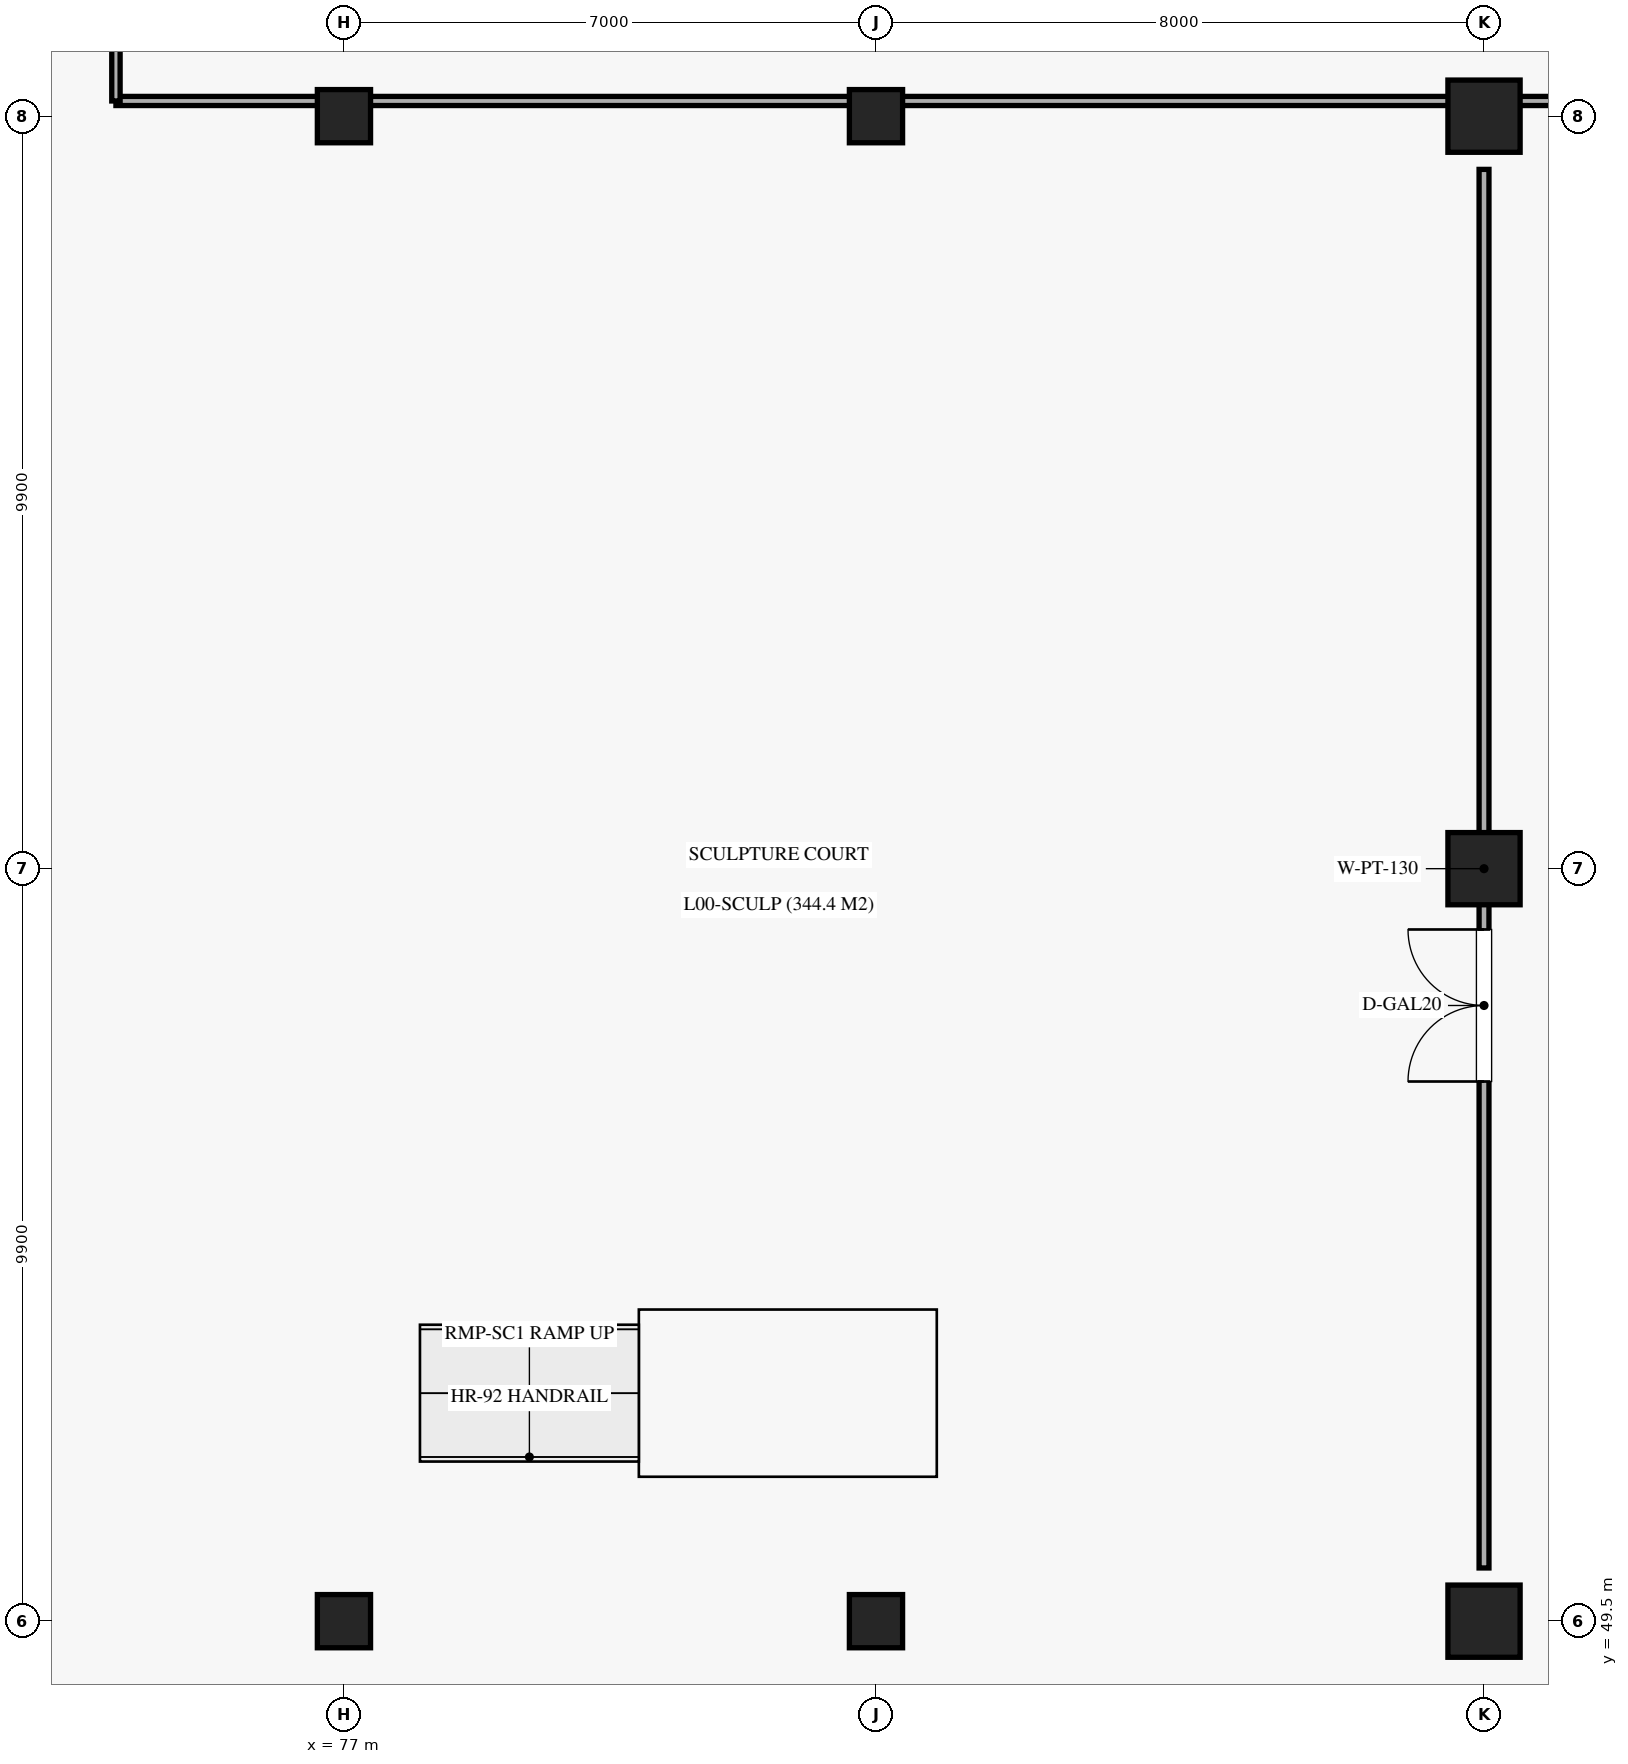
"""IFC4 building model, lengths in metres.
Left out: names, types, materials, properties, quantities, classifications, styles, units other than length and angle.
Written with IfcOpenShell. Run it as: python <this file> out.ifc"""

import sys

from ifc_helpers import new_model, si_unit, direction, frame, frame_2d, origin, origin_2d, place, context, subcontext, project, spatial, rectangle, extrude, element, fill, save


model = new_model("IFC4")
c1 = context("Model", 3, precision=1e-05, world=origin(), true_north=direction((0.0, 1.0)))
c2 = subcontext(c1, "Body", "Model", "MODEL_VIEW")
j1 = project(units=[si_unit("LENGTHUNIT", "METRE"), si_unit("PLANEANGLEUNIT", "RADIAN")], contexts=[c1])
p1 = place(None, origin())
s1 = spatial("IfcSite", under=j1, at=p1, CompositionType="ELEMENT")
p2 = place(p1, origin())
s2 = spatial("IfcBuilding", under=s1, at=p2, CompositionType="ELEMENT")
p3 = place(p2, origin())
s3 = spatial("IfcBuildingStorey", under=s2, at=p3, CompositionType="ELEMENT", Elevation=0.0)
for number, where, z_axis, x_axis in (
    (1, (77.0, 49.5, 0.0), (0.0, 0.0, 1.0), (1.0, 0.0, 0.0)),
    (2, (77.0, 69.3, 0.0), (0.0, 0.0, 1.0), (1.0, 0.0, 0.0)),
    (3, (84.0, 49.5, 0.0), (0.0, 0.0, 1.0), (1.0, 0.0, 0.0)),
    (4, (84.0, 69.3, 0.0), (0.0, 0.0, 1.0), (1.0, 0.0, 0.0)),
):
    element("IfcColumn", number, at=place(p3, frame(where, z_axis=z_axis, x_axis=x_axis)), inside=s3, PredefinedType="COLUMN", context=c2, shape_type="SweptSolid", body=[
        extrude(rectangle(XDim=0.7, YDim=0.7, at=origin_2d()), origin(), (0.0, 0.0, 1.0), 5.44),
    ])
for number, where, z_axis, x_axis in (
    (5, (92.0, 49.5, 0.0), (0.0, 0.0, 1.0), (1.0, 0.0, 0.0)),
    (6, (92.0, 59.4, 0.0), (0.0, 0.0, 1.0), (1.0, 0.0, 0.0)),
    (7, (92.0, 69.3, 0.0), (0.0, 0.0, 1.0), (1.0, 0.0, 0.0)),
):
    element("IfcColumn", number, at=place(p3, frame(where, z_axis=z_axis, x_axis=x_axis)), inside=s3, PredefinedType="COLUMN", context=c2, shape_type="SweptSolid", body=[
        extrude(rectangle(XDim=0.95, YDim=0.95, at=origin_2d()), origin(), (0.0, 0.0, 1.0), 5.44),
    ])
p4 = place(p3, frame((92.0, 50.2, 0.0), z_axis=(0.0, 0.0, 1.0), x_axis=(0.0, 1.0, 0.0)))
e8 = element("IfcWall", 8, at=p4, inside=s3, PredefinedType="PARTITIONING", context=c2, shape_type="SweptSolid", body=[
    extrude(rectangle(XDim=18.4, YDim=0.13, at=frame_2d((9.2, 0.0))), origin(), (0.0, 0.0, 1.0), 4.3),
])
p5 = place(p4, frame((6.4, 0.0, 0.0)))
e9 = element("IfcOpeningElement", 9, at=p5, cuts=e8, PredefinedType="OPENING", context=c2, shape_type="SweptSolid", body=[
    extrude(rectangle(XDim=2.0, YDim=2.5, at=frame_2d((1.0, 1.25))), frame((0.0, 0.075, 0.0), z_axis=(0.0, -1.0, 0.0), x_axis=(1.0, 0.0, 0.0)), (0.0, 0.0, 1.0), 0.15),
])
p6 = place(p3, frame((74.0, 69.5, 0.0), z_axis=(0.0, 0.0, 1.0), x_axis=(1.0, 0.0, 0.0)))
e10 = element("IfcWall", 10, at=p6, inside=s3, PredefinedType="PARTITIONING", context=c2, shape_type="SweptSolid", body=[
    extrude(rectangle(XDim=23.4, YDim=0.12, at=frame_2d((11.7, 0.0))), origin(), (0.0, 0.0, 1.0), 4.3),
])
p7 = place(p3, frame((74.0, 69.5, 0.0), z_axis=(0.0, 0.0, 1.0), x_axis=(0.0, 1.0, 0.0)))
e11 = element("IfcWall", 11, at=p7, inside=s3, PredefinedType="PARTITIONING", context=c2, shape_type="SweptSolid", body=[
    extrude(rectangle(XDim=18.9, YDim=0.11, at=frame_2d((9.45, 0.0))), origin(), (0.0, 0.0, 1.0), 4.3),
])
p8 = place(p7, frame((8.0, 0.0, 0.0)))
e12 = element("IfcOpeningElement", 12, at=p8, cuts=e11, PredefinedType="OPENING", context=c2, shape_type="SweptSolid", body=[
    extrude(rectangle(XDim=2.0, YDim=2.5, at=frame_2d((1.0, 1.25))), frame((0.0, 0.065, 0.0), z_axis=(0.0, -1.0, 0.0), x_axis=(1.0, 0.0, 0.0)), (0.0, 0.0, 1.0), 0.13),
])
p9 = place(p5, origin())
e13 = element("IfcDoor", 13, at=p9, inside=s3, OperationType="DOUBLE_DOOR_SINGLE_SWING", PredefinedType="DOOR", context=c2, shape_type="SweptSolid", body=[
    extrude(rectangle(XDim=2.0, YDim=2.5, at=frame_2d((1.0, 1.25))), frame((0.0, 0.025, 0.0), z_axis=(0.0, -1.0, 0.0), x_axis=(1.0, 0.0, 0.0)), (0.0, 0.0, 1.0), 0.05),
])
fill(e9, e13)
save(model, sys.argv[1])
